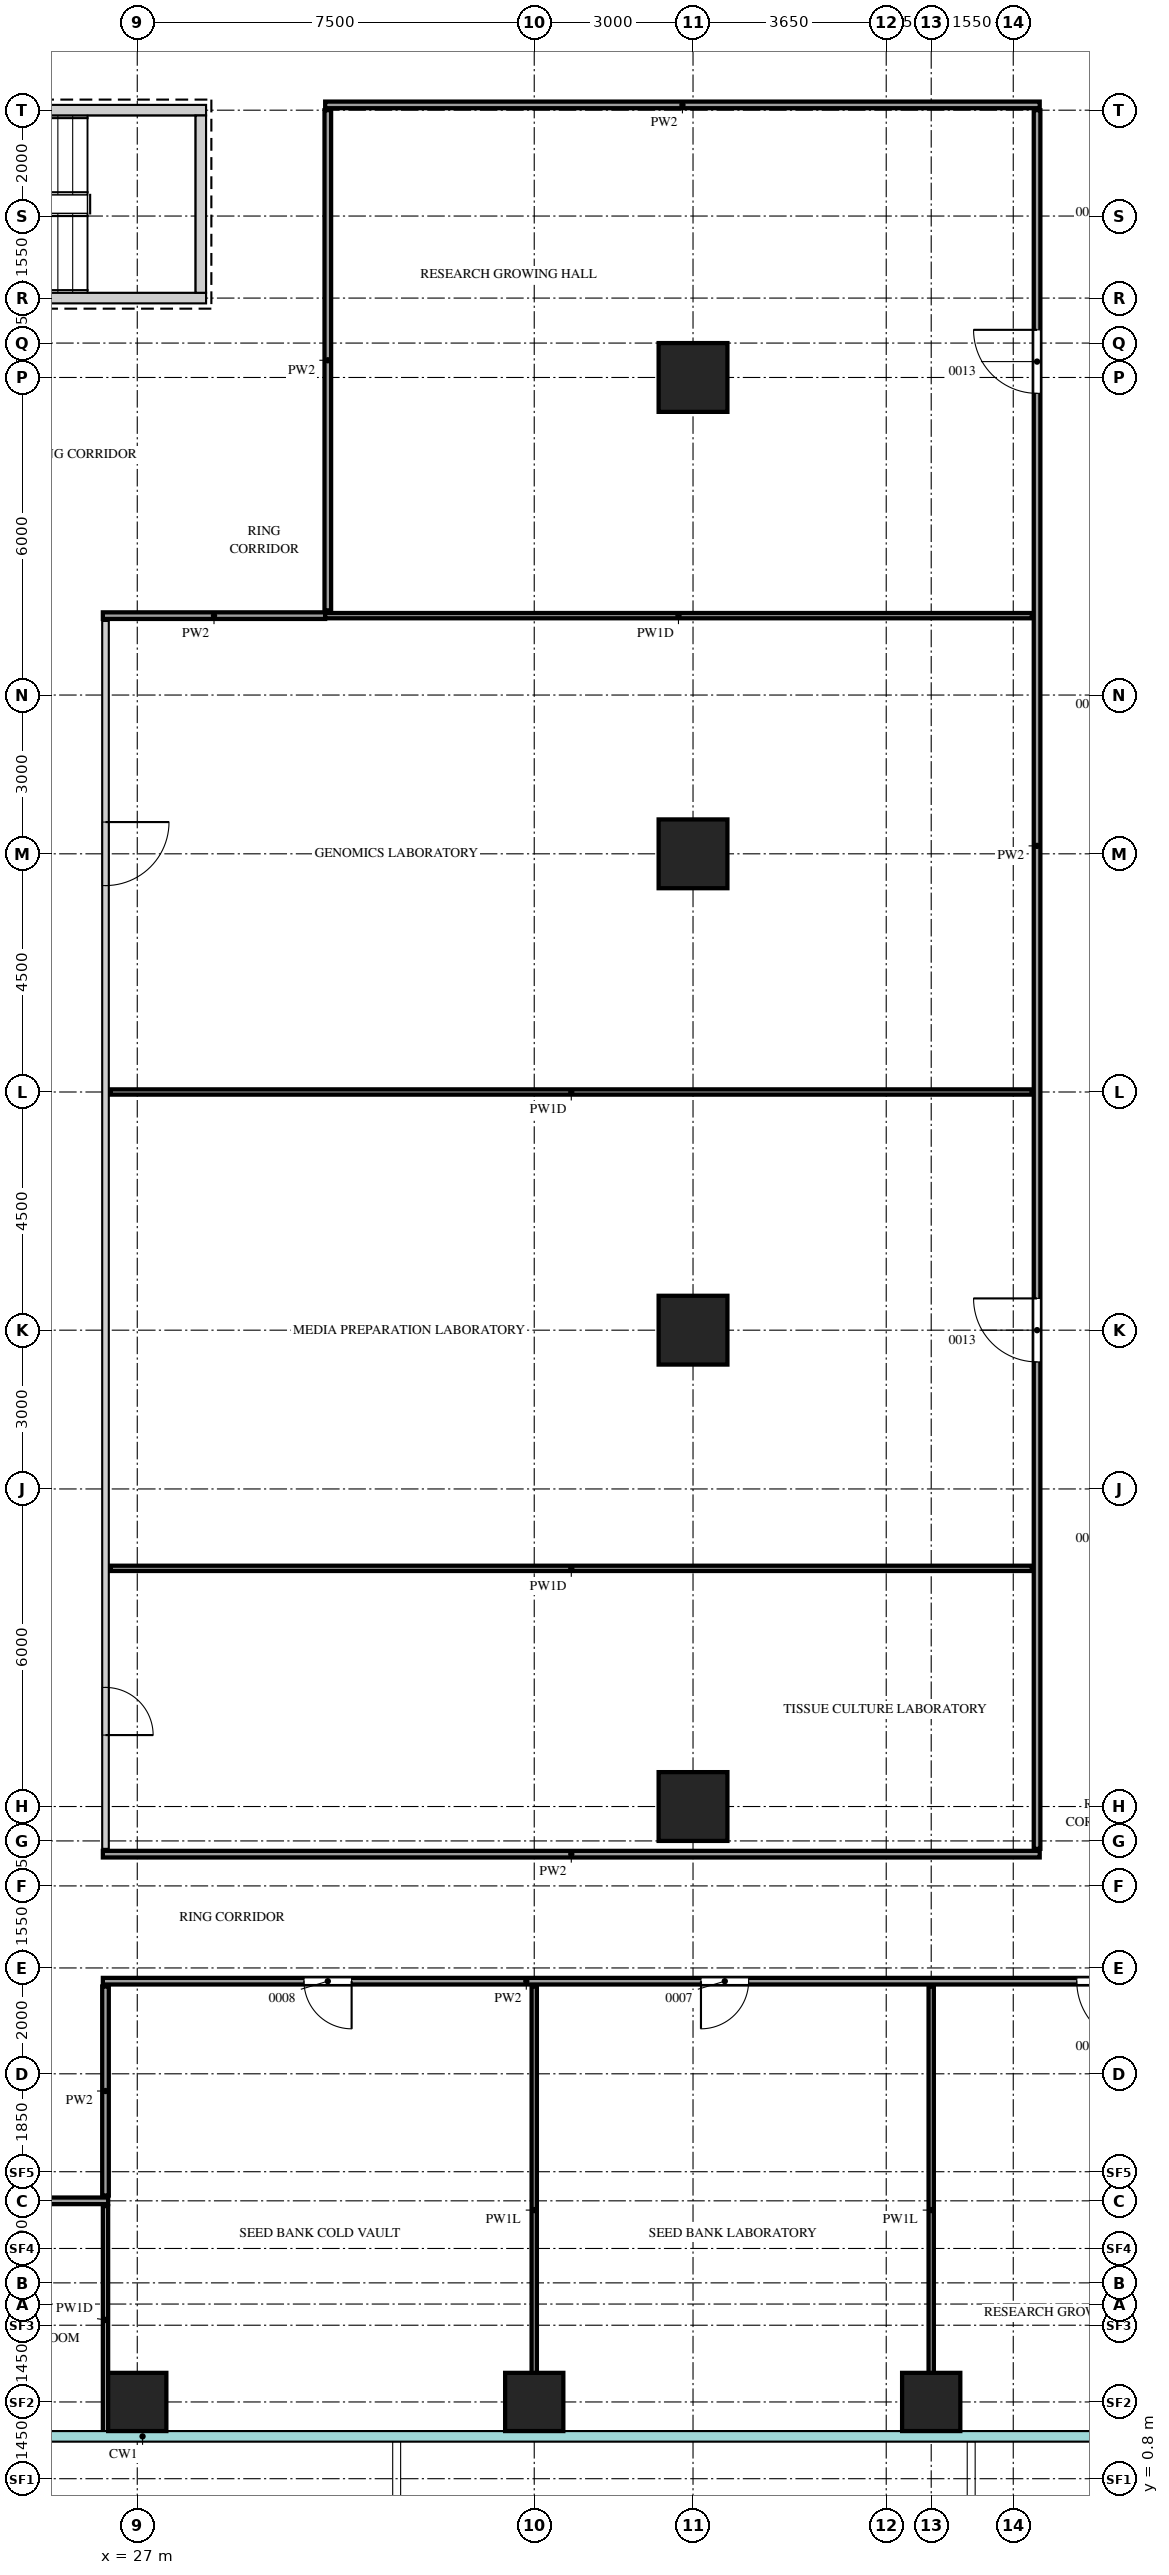
"""IFC4 building model, lengths in metres.
Left out: names, types, materials, properties, quantities, classifications, styles, units other than length and angle.
Written with IfcOpenShell. Run it as: python <this file> out.ifc"""

import sys

from ifc_helpers import new_model, si_unit, direction, frame, frame_2d, origin, origin_2d, place, context, subcontext, project, spatial, rectangle, extrude, source, transform, mapped, element, fill, save


model = new_model("IFC4")
c1 = context("Model", 3, precision=1e-05, world=origin(), true_north=direction((0.0, 1.0)))
c2 = subcontext(c1, "Body", "Model", "MODEL_VIEW")
j1 = project(units=[si_unit("LENGTHUNIT", "METRE"), si_unit("PLANEANGLEUNIT", "RADIAN")], contexts=[c1])
p1 = place(None, origin())
s1 = spatial("IfcSite", under=j1, at=p1, CompositionType="ELEMENT")
p2 = place(p1, origin())
s2 = spatial("IfcBuilding", under=s1, at=p2, CompositionType="ELEMENT")
p3 = place(p2, frame((0.0, 0.0, 110.3)))
s3 = spatial("IfcBuildingStorey", under=s2, at=p3, CompositionType="ELEMENT", Elevation=110.3)
m1 = source(origin(), c2, "Body", "SweptSolid", [
    extrude(rectangle(XDim=7.1, YDim=0.2, at=frame_2d((3.55, 0.0))), origin(), (0.0, 0.0, 1.0), 4.1),
])
p4 = place(p3, frame((21.2, 45.55, 0.0), z_axis=(0.0, 0.0, 1.0), x_axis=(1.0, 0.0, 0.0)))
e1 = element("IfcWall", 1, at=p4, inside=s3, PredefinedType="SHEAR", context=c2, shape_type="MappedRepresentation", body=[
    mapped(m1, transform((0.0, 0.0, 0.0))),
])
m2 = source(origin(), c2, "Body", "SweptSolid", [
    extrude(rectangle(XDim=1.2, YDim=2.1, at=frame_2d((0.6, 1.05))), frame((0.0, 0.11, 0.0), z_axis=(0.0, -1.0, 0.0), x_axis=(1.0, 0.0, 0.0)), (0.0, 0.0, 1.0), 0.22),
])
p5 = place(p4, frame((0.15, 0.0, 0.0)))
e2 = element("IfcOpeningElement", 2, at=p5, cuts=e1, PredefinedType="OPENING", context=c2, shape_type="MappedRepresentation", body=[
    mapped(m2, transform((0.0, 0.0, 0.0))),
])
p6 = place(p3, frame((21.2, 42.0, 0.0), z_axis=(0.0, 0.0, 1.0), x_axis=(1.0, 0.0, 0.0)))
e3 = element("IfcWall", 3, at=p6, inside=s3, PredefinedType="SHEAR", context=c2, shape_type="MappedRepresentation", body=[
    mapped(m1, transform((0.0, 0.0, 0.0))),
])
m3 = source(origin(), c2, "Body", "SweptSolid", [
    extrude(rectangle(XDim=3.35, YDim=0.2, at=frame_2d((1.675, 0.0))), origin(), (0.0, 0.0, 1.0), 4.1),
])
p7 = place(p3, frame((28.2, 42.1, 0.0), z_axis=(0.0, 0.0, 1.0), x_axis=(0.0, 1.0, 0.0)))
e4 = element("IfcWall", 4, at=p7, inside=s3, PredefinedType="SHEAR", context=c2, shape_type="MappedRepresentation", body=[
    mapped(m3, transform((0.0, 0.0, 0.0))),
])
m4 = source(origin(), c2, "Body", "SweptSolid", [
    extrude(rectangle(XDim=1.1, YDim=1.1, at=origin_2d()), origin(), (0.0, 0.0, 1.0), 4.1),
])
for number, where, z_axis, x_axis in (
    (5, (27.0, 2.25, 0.0), (0.0, 0.0, 1.0), (1.0, 0.0, 0.0)),
    (6, (34.5, 2.25, 0.0), (0.0, 0.0, 1.0), (1.0, 0.0, 0.0)),
    (7, (42.0, 2.25, 0.0), (0.0, 0.0, 1.0), (1.0, 0.0, 0.0)),
):
    element("IfcColumn", number, at=place(p3, frame(where, z_axis=z_axis, x_axis=x_axis)), inside=s3, PredefinedType="COLUMN", context=c2, shape_type="MappedRepresentation", body=[
        mapped(m4, transform((0.0, 0.0, 0.0))),
    ])
m5 = source(origin(), c2, "Body", "SweptSolid", [
    extrude(rectangle(XDim=1.3, YDim=1.3, at=origin_2d()), origin(), (0.0, 0.0, 1.0), 4.1),
])
for number, where, z_axis, x_axis in (
    (8, (37.5, 13.5, 0.0), (0.0, 0.0, 1.0), (1.0, 0.0, 0.0)),
    (9, (37.5, 22.5, 0.0), (0.0, 0.0, 1.0), (1.0, 0.0, 0.0)),
    (10, (37.5, 31.5, 0.0), (0.0, 0.0, 1.0), (1.0, 0.0, 0.0)),
    (11, (37.5, 40.5, 0.0), (0.0, 0.0, 1.0), (1.0, 0.0, 0.0)),
):
    element("IfcColumn", number, at=place(p3, frame(where, z_axis=z_axis, x_axis=x_axis)), inside=s3, PredefinedType="COLUMN", context=c2, shape_type="MappedRepresentation", body=[
        mapped(m5, transform((0.0, 0.0, 0.0))),
    ])
m6 = source(origin(), c2, "Body", "SweptSolid", [
    extrude(rectangle(XDim=4.3, YDim=0.1, at=frame_2d((2.15, 0.0))), origin(), (0.0, 0.0, 1.0), 4.2),
])
p8 = place(p3, frame((26.4, 1.65, 0.0), z_axis=(0.0, 0.0, 1.0), x_axis=(0.0, 1.0, 0.0)))
e12 = element("IfcWall", 12, at=p8, inside=s3, PredefinedType="PARTITIONING", context=c2, shape_type="MappedRepresentation", body=[
    mapped(m6, transform((0.0, 0.0, 0.0))),
])
m7 = source(origin(), c2, "Body", "SweptSolid", [
    extrude(rectangle(XDim=8.45, YDim=0.1, at=frame_2d((4.225, 0.0))), origin(), (0.0, 0.0, 1.0), 3.6),
])
for number, where, z_axis, x_axis in (
    (13, (34.5, 1.65, 0.0), (0.0, 0.0, 1.0), (0.0, 1.0, 0.0)),
    (14, (42.0, 1.65, 0.0), (0.0, 0.0, 1.0), (0.0, 1.0, 0.0)),
):
    element("IfcWall", number, at=place(p3, frame(where, z_axis=z_axis, x_axis=x_axis)), inside=s3, PredefinedType="PARTITIONING", context=c2, shape_type="MappedRepresentation", body=[
        mapped(m7, transform((0.0, 0.0, 0.0))),
    ])
m8 = source(origin(), c2, "Body", "SweptSolid", [
    extrude(rectangle(XDim=22.3, YDim=0.125, at=frame_2d((11.15, 0.0))), origin(), (0.0, 0.0, 1.0), 3.55),
])
p9 = place(p3, frame((4.15, 6.05, 0.0), z_axis=(0.0, 0.0, 1.0), x_axis=(1.0, 0.0, 0.0)))
e15 = element("IfcWall", 15, at=p9, inside=s3, PredefinedType="PARTITIONING", context=c2, shape_type="MappedRepresentation", body=[
    mapped(m8, transform((0.0, 0.0, 0.0))),
])
m9 = source(origin(), c2, "Body", "SweptSolid", [
    extrude(rectangle(XDim=0.9, YDim=2.1, at=frame_2d((0.45, 1.05))), frame((0.0, 0.073, 0.0), z_axis=(0.0, -1.0, 0.0), x_axis=(1.0, 0.0, 0.0)), (0.0, 0.0, 1.0), 0.145),
])
p10 = place(p9, frame((3.5, 0.0, 0.0)))
e16 = element("IfcOpeningElement", 16, at=p10, cuts=e15, PredefinedType="OPENING", context=c2, shape_type="MappedRepresentation", body=[
    mapped(m9, transform((0.0, 0.0, 0.0))),
])
p11 = place(p9, frame((11.0, 0.0, 0.0)))
e17 = element("IfcOpeningElement", 17, at=p11, cuts=e15, PredefinedType="OPENING", context=c2, shape_type="MappedRepresentation", body=[
    mapped(m9, transform((0.0, 0.0, 0.0))),
])
p12 = place(p9, frame((18.35, 0.0, 0.0)))
e18 = element("IfcOpeningElement", 18, at=p12, cuts=e15, PredefinedType="OPENING", context=c2, shape_type="MappedRepresentation", body=[
    mapped(m9, transform((0.0, 0.0, 0.0))),
])
m10 = source(origin(), c2, "Body", "SweptSolid", [
    extrude(rectangle(XDim=3.95, YDim=0.125, at=frame_2d((1.975, 0.0))), origin(), (0.0, 0.0, 1.0), 4.2),
])
p13 = place(p3, frame((26.4, 6.15, 0.0), z_axis=(0.0, 0.0, 1.0), x_axis=(0.0, 1.0, 0.0)))
e19 = element("IfcWall", 19, at=p13, inside=s3, PredefinedType="PARTITIONING", context=c2, shape_type="MappedRepresentation", body=[
    mapped(m10, transform((0.0, 0.0, 0.0))),
])
m11 = source(origin(), c2, "Body", "SweptSolid", [
    extrude(rectangle(XDim=20.0, YDim=0.125, at=frame_2d((10.0, 0.0))), origin(), (0.0, 0.0, 1.0), 4.2),
])
p14 = place(p3, frame((26.35, 10.2, 0.0), z_axis=(0.0, 0.0, 1.0), x_axis=(1.0, 0.0, 0.0)))
e20 = element("IfcWall", 20, at=p14, inside=s3, PredefinedType="PARTITIONING", context=c2, shape_type="MappedRepresentation", body=[
    mapped(m11, transform((0.0, 0.0, 0.0))),
])
p15 = place(p14, frame((3.8, 0.0, 0.0)))
e21 = element("IfcOpeningElement", 21, at=p15, cuts=e20, PredefinedType="OPENING", context=c2, shape_type="MappedRepresentation", body=[
    mapped(m9, transform((0.0, 0.0, 0.0))),
])
p16 = place(p14, frame((11.3, 0.0, 0.0)))
e22 = element("IfcOpeningElement", 22, at=p16, cuts=e20, PredefinedType="OPENING", context=c2, shape_type="MappedRepresentation", body=[
    mapped(m9, transform((0.0, 0.0, 0.0))),
])
m12 = source(origin(), c2, "Body", "SweptSolid", [
    extrude(rectangle(XDim=1.2, YDim=2.1, at=frame_2d((0.6, 1.05))), frame((0.0, 0.073, 0.0), z_axis=(0.0, -1.0, 0.0), x_axis=(1.0, 0.0, 0.0)), (0.0, 0.0, 1.0), 0.145),
])
p17 = place(p14, frame((18.4, 0.0, 0.0)))
e23 = element("IfcOpeningElement", 23, at=p17, cuts=e20, PredefinedType="OPENING", context=c2, shape_type="MappedRepresentation", body=[
    mapped(m12, transform((0.0, 0.0, 0.0))),
])
m13 = source(origin(), c2, "Body", "SweptSolid", [
    extrude(rectangle(XDim=17.7, YDim=0.125, at=frame_2d((8.85, 0.0))), origin(), (0.0, 0.0, 1.0), 4.2),
])
p18 = place(p3, frame((26.35, 12.6, 0.0), z_axis=(0.0, 0.0, 1.0), x_axis=(1.0, 0.0, 0.0)))
e24 = element("IfcWall", 24, at=p18, inside=s3, PredefinedType="PARTITIONING", context=c2, shape_type="MappedRepresentation", body=[
    mapped(m13, transform((0.0, 0.0, 0.0))),
])
m14 = source(origin(), c2, "Body", "SweptSolid", [
    extrude(rectangle(XDim=23.2, YDim=0.125, at=frame_2d((11.6, 0.0))), origin(), (0.0, 0.0, 1.0), 4.2),
])
p19 = place(p3, frame((26.4, 12.7, 0.0), z_axis=(0.0, 0.0, 1.0), x_axis=(0.0, 1.0, 0.0)))
e25 = element("IfcWall", 25, at=p19, inside=s3, PredefinedType="PARTITIONING", context=c2, shape_type="MappedRepresentation", body=[
    mapped(m14, transform((0.0, 0.0, 0.0))),
])
p20 = place(p19, frame((2.15, 0.0, 0.0)))
e26 = element("IfcOpeningElement", 26, at=p20, cuts=e25, PredefinedType="OPENING", context=c2, shape_type="MappedRepresentation", body=[
    mapped(m9, transform((0.0, 0.0, 0.0))),
])
p21 = place(p19, frame((18.2, 0.0, 0.0)))
e27 = element("IfcOpeningElement", 27, at=p21, cuts=e25, PredefinedType="OPENING", context=c2, shape_type="MappedRepresentation", body=[
    mapped(m12, transform((0.0, 0.0, 0.0))),
])
m15 = source(origin(), c2, "Body", "SweptSolid", [
    extrude(rectangle(XDim=32.85, YDim=0.125, at=frame_2d((16.425, 0.0))), origin(), (0.0, 0.0, 1.0), 4.2),
])
p22 = place(p3, frame((44.0, 12.7, 0.0), z_axis=(0.0, 0.0, 1.0), x_axis=(0.0, 1.0, 0.0)))
e28 = element("IfcWall", 28, at=p22, inside=s3, PredefinedType="PARTITIONING", context=c2, shape_type="MappedRepresentation", body=[
    mapped(m15, transform((0.0, 0.0, 0.0))),
])
p23 = place(p22, frame((9.2, 0.0, 0.0)))
e29 = element("IfcOpeningElement", 29, at=p23, cuts=e28, PredefinedType="OPENING", context=c2, shape_type="MappedRepresentation", body=[
    mapped(m12, transform((0.0, 0.0, 0.0))),
])
p24 = place(p22, frame((27.5, 0.0, 0.0)))
e30 = element("IfcOpeningElement", 30, at=p24, cuts=e28, PredefinedType="OPENING", context=c2, shape_type="MappedRepresentation", body=[
    mapped(m12, transform((0.0, 0.0, 0.0))),
])
m16 = source(origin(), c2, "Body", "SweptSolid", [
    extrude(rectangle(XDim=17.4, YDim=0.1, at=frame_2d((8.7, 0.0))), origin(), (0.0, 0.0, 1.0), 4.2),
])
for number, where, z_axis, x_axis in (
    (31, (26.5, 18.0, 0.0), (0.0, 0.0, 1.0), (1.0, 0.0, 0.0)),
    (32, (26.5, 27.0, 0.0), (0.0, 0.0, 1.0), (1.0, 0.0, 0.0)),
):
    element("IfcWall", number, at=place(p3, frame(where, z_axis=z_axis, x_axis=x_axis)), inside=s3, PredefinedType="PARTITIONING", context=c2, shape_type="MappedRepresentation", body=[
        mapped(m16, transform((0.0, 0.0, 0.0))),
    ])
m17 = source(origin(), c2, "Body", "SweptSolid", [
    extrude(rectangle(XDim=4.2, YDim=0.125, at=frame_2d((2.1, 0.0))), origin(), (0.0, 0.0, 1.0), 4.2),
])
p25 = place(p3, frame((26.35, 36.0, 0.0), z_axis=(0.0, 0.0, 1.0), x_axis=(1.0, 0.0, 0.0)))
e33 = element("IfcWall", 33, at=p25, inside=s3, PredefinedType="PARTITIONING", context=c2, shape_type="MappedRepresentation", body=[
    mapped(m17, transform((0.0, 0.0, 0.0))),
])
m18 = source(origin(), c2, "Body", "SweptSolid", [
    extrude(rectangle(XDim=13.35, YDim=0.1, at=frame_2d((6.675, 0.0))), origin(), (0.0, 0.0, 1.0), 4.2),
])
p26 = place(p3, frame((30.55, 36.0, 0.0), z_axis=(0.0, 0.0, 1.0), x_axis=(1.0, 0.0, 0.0)))
e34 = element("IfcWall", 34, at=p26, inside=s3, PredefinedType="PARTITIONING", context=c2, shape_type="MappedRepresentation", body=[
    mapped(m18, transform((0.0, 0.0, 0.0))),
])
m19 = source(origin(), c2, "Body", "SweptSolid", [
    extrude(rectangle(XDim=9.45, YDim=0.125, at=frame_2d((4.725, 0.0))), origin(), (0.0, 0.0, 1.0), 4.2),
])
p27 = place(p3, frame((30.6, 36.1, 0.0), z_axis=(0.0, 0.0, 1.0), x_axis=(0.0, 1.0, 0.0)))
e35 = element("IfcWall", 35, at=p27, inside=s3, PredefinedType="PARTITIONING", context=c2, shape_type="MappedRepresentation", body=[
    mapped(m19, transform((0.0, 0.0, 0.0))),
])
m20 = source(origin(), c2, "Body", "SweptSolid", [
    extrude(rectangle(XDim=13.5, YDim=0.125, at=frame_2d((6.75, 0.0))), origin(), (0.0, 0.0, 1.0), 4.2),
])
p28 = place(p3, frame((30.55, 45.65, 0.0), z_axis=(0.0, 0.0, 1.0), x_axis=(1.0, 0.0, 0.0)))
e36 = element("IfcWall", 36, at=p28, inside=s3, PredefinedType="PARTITIONING", context=c2, shape_type="MappedRepresentation", body=[
    mapped(m20, transform((0.0, 0.0, 0.0))),
])
m21 = source(origin(), c2, "Body", "SweptSolid", [
    extrude(rectangle(XDim=0.9, YDim=2.1, at=frame_2d((0.45, 1.05))), frame((0.0, 0.025, 0.0), z_axis=(0.0, -1.0, 0.0), x_axis=(1.0, 0.0, 0.0)), (0.0, 0.0, 1.0), 0.05),
])
p29 = place(p15, origin())
e37 = element("IfcDoor", 37, at=p29, inside=s3, OperationType="SINGLE_SWING_RIGHT", PredefinedType="DOOR", context=c2, shape_type="MappedRepresentation", body=[
    mapped(m21, transform((0.0, 0.0, 0.0))),
])
fill(e21, e37)
p30 = place(p16, origin())
e38 = element("IfcDoor", 38, at=p30, inside=s3, OperationType="SINGLE_SWING_LEFT", PredefinedType="DOOR", context=c2, shape_type="MappedRepresentation", body=[
    mapped(m21, transform((0.0, 0.0, 0.0))),
])
fill(e22, e38)
m22 = source(origin(), c2, "Body", "SweptSolid", [
    extrude(rectangle(XDim=1.2, YDim=2.1, at=frame_2d((0.6, 1.05))), frame((0.0, 0.025, 0.0), z_axis=(0.0, -1.0, 0.0), x_axis=(1.0, 0.0, 0.0)), (0.0, 0.0, 1.0), 0.05),
])
p31 = place(p17, origin())
e39 = element("IfcDoor", 39, at=p31, inside=s3, OperationType="SINGLE_SWING_RIGHT", PredefinedType="DOOR", context=c2, shape_type="MappedRepresentation", body=[
    mapped(m22, transform((0.0, 0.0, 0.0))),
])
fill(e23, e39)
p32 = place(p20, origin())
e40 = element("IfcDoor", 40, at=p32, inside=s3, OperationType="SINGLE_SWING_LEFT", PredefinedType="DOOR", context=c2, shape_type="MappedRepresentation", body=[
    mapped(m21, transform((0.0, 0.0, 0.0))),
])
fill(e26, e40)
p33 = place(p23, origin())
e41 = element("IfcDoor", 41, at=p33, inside=s3, OperationType="SINGLE_SWING_LEFT", PredefinedType="DOOR", context=c2, shape_type="MappedRepresentation", body=[
    mapped(m22, transform((0.0, 0.0, 0.0))),
])
fill(e29, e41)
p34 = place(p21, origin())
e42 = element("IfcDoor", 42, at=p34, inside=s3, OperationType="SINGLE_SWING_RIGHT", PredefinedType="DOOR", context=c2, shape_type="MappedRepresentation", body=[
    mapped(m22, transform((0.0, 0.0, 0.0))),
])
fill(e27, e42)
p35 = place(p24, origin())
e43 = element("IfcDoor", 43, at=p35, inside=s3, OperationType="SINGLE_SWING_LEFT", PredefinedType="DOOR", context=c2, shape_type="MappedRepresentation", body=[
    mapped(m22, transform((0.0, 0.0, 0.0))),
])
fill(e30, e43)
save(model, sys.argv[1])
